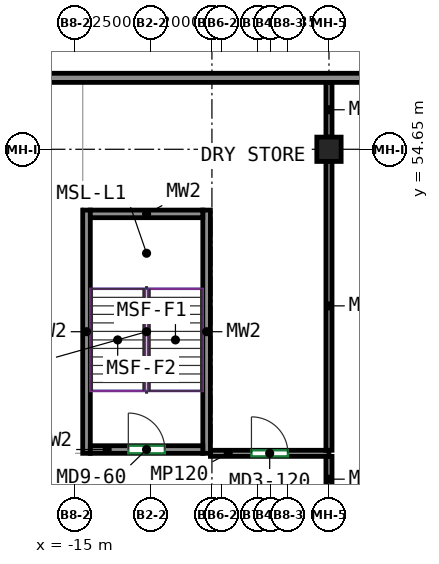
"""IFC4 building model, lengths in metres.
Left out: names, types, materials, properties, quantities, classifications, styles, units other than length and angle.
Written with IfcOpenShell. Run it as: python <this file> out.ifc"""

import sys

from ifc_helpers import new_model, si_unit, direction, frame, frame_2d, origin, origin_2d, place, context, subcontext, project, spatial, rectangle, extrude, source, transform, mapped, element, fill, save


model = new_model("IFC4")
c1 = context("Model", 3, precision=1e-05, world=origin(), true_north=direction((0.0, 1.0)))
c2 = subcontext(c1, "Body", "Model", "MODEL_VIEW")
j1 = project(units=[si_unit("LENGTHUNIT", "METRE"), si_unit("PLANEANGLEUNIT", "RADIAN")], contexts=[c1])
p1 = place(None, origin())
s1 = spatial("IfcSite", under=j1, at=p1, CompositionType="ELEMENT")
p2 = place(p1, origin())
s2 = spatial("IfcBuilding", under=s1, at=p2, CompositionType="ELEMENT")
p3 = place(p2, frame((0.0, 0.0, 9.0)))
s3 = spatial("IfcBuildingStorey", under=s2, at=p3, CompositionType="ELEMENT", Elevation=9.0)
m1 = source(origin(), c2, "Body", "SweptSolid", [
    extrude(rectangle(XDim=0.8, YDim=0.8, at=origin_2d()), origin(), (0.0, 0.0, 1.0), 4.1),
])
p4 = place(p3, frame((-6.65, 54.65, 0.0), z_axis=(0.0, 0.0, 1.0), x_axis=(1.0, 0.0, 0.0)))
e1 = element("IfcColumn", 1, at=p4, inside=s3, PredefinedType="COLUMN", context=c2, shape_type="MappedRepresentation", body=[
    mapped(m1, transform((0.0, 0.0, 0.0))),
])
m2 = source(origin(), c2, "Body", "SweptSolid", [
    extrude(rectangle(XDim=8.0, YDim=0.25, at=frame_2d((4.0, 0.0))), origin(), (0.0, 0.0, 1.0), 4.1),
])
for number, where, z_axis, x_axis in (
    (2, (-14.625, 44.65, 0.0), (0.0, 0.0, 1.0), (0.0, 1.0, 0.0)),
    (3, (-10.675, 44.65, 0.0), (0.0, 0.0, 1.0), (0.0, 1.0, 0.0)),
):
    element("IfcWall", number, at=place(p3, frame(where, z_axis=z_axis, x_axis=x_axis)), inside=s3, PredefinedType="SHEAR", context=c2, shape_type="MappedRepresentation", body=[
        mapped(m2, transform((0.0, 0.0, 0.0))),
    ])
m3 = source(origin(), c2, "Body", "SweptSolid", [
    extrude(rectangle(XDim=3.7, YDim=0.25, at=frame_2d((1.85, 0.0))), origin(), (0.0, 0.0, 1.0), 4.1),
])
p5 = place(p3, frame((-14.5, 44.775, 0.0), z_axis=(0.0, 0.0, 1.0), x_axis=(1.0, 0.0, 0.0)))
e4 = element("IfcWall", 4, at=p5, inside=s3, PredefinedType="SHEAR", context=c2, shape_type="MappedRepresentation", body=[
    mapped(m3, transform((0.0, 0.0, 0.0))),
])
p6 = place(p5, frame((1.25, 0.0, 0.0)))
e5 = element("IfcOpeningElement", 5, at=p6, cuts=e4, PredefinedType="OPENING", context=c2, shape_type="SweptSolid", body=[
    extrude(rectangle(XDim=1.2, YDim=2.1, at=frame_2d((0.6, 1.05))), frame((0.0, 0.135, 0.0), z_axis=(0.0, -1.0, 0.0), x_axis=(1.0, 0.0, 0.0)), (0.0, 0.0, 1.0), 0.27),
])
p7 = place(p3, frame((-14.5, 52.525, 0.0), z_axis=(0.0, 0.0, 1.0), x_axis=(1.0, 0.0, 0.0)))
e6 = element("IfcWall", 6, at=p7, inside=s3, PredefinedType="SHEAR", context=c2, shape_type="MappedRepresentation", body=[
    mapped(m3, transform((0.0, 0.0, 0.0))),
])
m4 = source(origin(), c2, "Body", "SweptSolid", [
    extrude(rectangle(XDim=112.7, YDim=0.3, at=frame_2d((56.35, 0.0))), origin(), (0.0, 0.0, 1.0), 4.1),
])
p8 = place(p3, frame((-56.85, 57.0, 0.0), z_axis=(0.0, 0.0, 1.0), x_axis=(1.0, 0.0, 0.0)))
e7 = element("IfcWall", 7, at=p8, inside=s3, PredefinedType="SOLIDWALL", context=c2, shape_type="MappedRepresentation", body=[
    mapped(m4, transform((0.0, 0.0, 0.0))),
])
p9 = place(p8, frame((3.15, 0.0, 0.9)))
e8 = element("IfcOpeningElement", 8, at=p9, cuts=e7, PredefinedType="OPENING", context=c2, shape_type="SweptSolid", body=[
    extrude(rectangle(XDim=2.4, YDim=1.8, at=frame_2d((1.2, 0.9))), frame((0.0, 0.16, 0.0), z_axis=(0.0, -1.0, 0.0), x_axis=(1.0, 0.0, 0.0)), (0.0, 0.0, 1.0), 0.32),
])
p10 = place(p8, frame((7.15, 0.0, 0.9)))
e9 = element("IfcOpeningElement", 9, at=p10, cuts=e7, PredefinedType="OPENING", context=c2, shape_type="SweptSolid", body=[
    extrude(rectangle(XDim=2.4, YDim=1.8, at=frame_2d((1.2, 0.9))), frame((0.0, 0.16, 0.0), z_axis=(0.0, -1.0, 0.0), x_axis=(1.0, 0.0, 0.0)), (0.0, 0.0, 1.0), 0.32),
])
p11 = place(p8, frame((11.15, 0.0, 0.9)))
e10 = element("IfcOpeningElement", 10, at=p11, cuts=e7, PredefinedType="OPENING", context=c2, shape_type="SweptSolid", body=[
    extrude(rectangle(XDim=2.4, YDim=1.8, at=frame_2d((1.2, 0.9))), frame((0.0, 0.16, 0.0), z_axis=(0.0, -1.0, 0.0), x_axis=(1.0, 0.0, 0.0)), (0.0, 0.0, 1.0), 0.32),
])
p12 = place(p8, frame((15.15, 0.0, 0.9)))
e11 = element("IfcOpeningElement", 11, at=p12, cuts=e7, PredefinedType="OPENING", context=c2, shape_type="SweptSolid", body=[
    extrude(rectangle(XDim=2.4, YDim=1.8, at=frame_2d((1.2, 0.9))), frame((0.0, 0.16, 0.0), z_axis=(0.0, -1.0, 0.0), x_axis=(1.0, 0.0, 0.0)), (0.0, 0.0, 1.0), 0.32),
])
p13 = place(p8, frame((19.15, 0.0, 0.9)))
e12 = element("IfcOpeningElement", 12, at=p13, cuts=e7, PredefinedType="OPENING", context=c2, shape_type="SweptSolid", body=[
    extrude(rectangle(XDim=2.4, YDim=1.8, at=frame_2d((1.2, 0.9))), frame((0.0, 0.16, 0.0), z_axis=(0.0, -1.0, 0.0), x_axis=(1.0, 0.0, 0.0)), (0.0, 0.0, 1.0), 0.32),
])
p14 = place(p8, frame((23.15, 0.0, 0.9)))
e13 = element("IfcOpeningElement", 13, at=p14, cuts=e7, PredefinedType="OPENING", context=c2, shape_type="SweptSolid", body=[
    extrude(rectangle(XDim=2.4, YDim=1.8, at=frame_2d((1.2, 0.9))), frame((0.0, 0.16, 0.0), z_axis=(0.0, -1.0, 0.0), x_axis=(1.0, 0.0, 0.0)), (0.0, 0.0, 1.0), 0.32),
])
p15 = place(p8, frame((27.15, 0.0, 0.9)))
e14 = element("IfcOpeningElement", 14, at=p15, cuts=e7, PredefinedType="OPENING", context=c2, shape_type="SweptSolid", body=[
    extrude(rectangle(XDim=2.4, YDim=1.8, at=frame_2d((1.2, 0.9))), frame((0.0, 0.16, 0.0), z_axis=(0.0, -1.0, 0.0), x_axis=(1.0, 0.0, 0.0)), (0.0, 0.0, 1.0), 0.32),
])
p16 = place(p8, frame((31.15, 0.0, 0.9)))
e15 = element("IfcOpeningElement", 15, at=p16, cuts=e7, PredefinedType="OPENING", context=c2, shape_type="SweptSolid", body=[
    extrude(rectangle(XDim=2.4, YDim=1.8, at=frame_2d((1.2, 0.9))), frame((0.0, 0.16, 0.0), z_axis=(0.0, -1.0, 0.0), x_axis=(1.0, 0.0, 0.0)), (0.0, 0.0, 1.0), 0.32),
])
p17 = place(p8, frame((35.15, 0.0, 0.9)))
e16 = element("IfcOpeningElement", 16, at=p17, cuts=e7, PredefinedType="OPENING", context=c2, shape_type="SweptSolid", body=[
    extrude(rectangle(XDim=2.4, YDim=1.8, at=frame_2d((1.2, 0.9))), frame((0.0, 0.16, 0.0), z_axis=(0.0, -1.0, 0.0), x_axis=(1.0, 0.0, 0.0)), (0.0, 0.0, 1.0), 0.32),
])
p18 = place(p8, frame((43.15, 0.0, 0.9)))
e17 = element("IfcOpeningElement", 17, at=p18, cuts=e7, PredefinedType="OPENING", context=c2, shape_type="SweptSolid", body=[
    extrude(rectangle(XDim=2.4, YDim=1.8, at=frame_2d((1.2, 0.9))), frame((0.0, 0.16, 0.0), z_axis=(0.0, -1.0, 0.0), x_axis=(1.0, 0.0, 0.0)), (0.0, 0.0, 1.0), 0.32),
])
p19 = place(p8, frame((47.15, 0.0, 0.9)))
e18 = element("IfcOpeningElement", 18, at=p19, cuts=e7, PredefinedType="OPENING", context=c2, shape_type="SweptSolid", body=[
    extrude(rectangle(XDim=2.4, YDim=1.8, at=frame_2d((1.2, 0.9))), frame((0.0, 0.16, 0.0), z_axis=(0.0, -1.0, 0.0), x_axis=(1.0, 0.0, 0.0)), (0.0, 0.0, 1.0), 0.32),
])
p20 = place(p8, frame((51.15, 0.0, 0.9)))
e19 = element("IfcOpeningElement", 19, at=p20, cuts=e7, PredefinedType="OPENING", context=c2, shape_type="SweptSolid", body=[
    extrude(rectangle(XDim=2.4, YDim=1.8, at=frame_2d((1.2, 0.9))), frame((0.0, 0.16, 0.0), z_axis=(0.0, -1.0, 0.0), x_axis=(1.0, 0.0, 0.0)), (0.0, 0.0, 1.0), 0.32),
])
p21 = place(p8, frame((55.15, 0.0, 0.9)))
e20 = element("IfcOpeningElement", 20, at=p21, cuts=e7, PredefinedType="OPENING", context=c2, shape_type="SweptSolid", body=[
    extrude(rectangle(XDim=2.4, YDim=1.8, at=frame_2d((1.2, 0.9))), frame((0.0, 0.16, 0.0), z_axis=(0.0, -1.0, 0.0), x_axis=(1.0, 0.0, 0.0)), (0.0, 0.0, 1.0), 0.32),
])
p22 = place(p8, frame((59.15, 0.0, 0.9)))
e21 = element("IfcOpeningElement", 21, at=p22, cuts=e7, PredefinedType="OPENING", context=c2, shape_type="SweptSolid", body=[
    extrude(rectangle(XDim=2.4, YDim=1.8, at=frame_2d((1.2, 0.9))), frame((0.0, 0.16, 0.0), z_axis=(0.0, -1.0, 0.0), x_axis=(1.0, 0.0, 0.0)), (0.0, 0.0, 1.0), 0.32),
])
p23 = place(p8, frame((63.15, 0.0, 0.9)))
e22 = element("IfcOpeningElement", 22, at=p23, cuts=e7, PredefinedType="OPENING", context=c2, shape_type="SweptSolid", body=[
    extrude(rectangle(XDim=2.4, YDim=1.8, at=frame_2d((1.2, 0.9))), frame((0.0, 0.16, 0.0), z_axis=(0.0, -1.0, 0.0), x_axis=(1.0, 0.0, 0.0)), (0.0, 0.0, 1.0), 0.32),
])
p24 = place(p8, frame((67.15, 0.0, 0.9)))
e23 = element("IfcOpeningElement", 23, at=p24, cuts=e7, PredefinedType="OPENING", context=c2, shape_type="SweptSolid", body=[
    extrude(rectangle(XDim=2.4, YDim=1.8, at=frame_2d((1.2, 0.9))), frame((0.0, 0.16, 0.0), z_axis=(0.0, -1.0, 0.0), x_axis=(1.0, 0.0, 0.0)), (0.0, 0.0, 1.0), 0.32),
])
p25 = place(p8, frame((71.15, 0.0, 0.9)))
e24 = element("IfcOpeningElement", 24, at=p25, cuts=e7, PredefinedType="OPENING", context=c2, shape_type="SweptSolid", body=[
    extrude(rectangle(XDim=2.4, YDim=1.8, at=frame_2d((1.2, 0.9))), frame((0.0, 0.16, 0.0), z_axis=(0.0, -1.0, 0.0), x_axis=(1.0, 0.0, 0.0)), (0.0, 0.0, 1.0), 0.32),
])
p26 = place(p8, frame((75.15, 0.0, 0.9)))
e25 = element("IfcOpeningElement", 25, at=p26, cuts=e7, PredefinedType="OPENING", context=c2, shape_type="SweptSolid", body=[
    extrude(rectangle(XDim=2.4, YDim=1.8, at=frame_2d((1.2, 0.9))), frame((0.0, 0.16, 0.0), z_axis=(0.0, -1.0, 0.0), x_axis=(1.0, 0.0, 0.0)), (0.0, 0.0, 1.0), 0.32),
])
p27 = place(p8, frame((79.15, 0.0, 0.9)))
e26 = element("IfcOpeningElement", 26, at=p27, cuts=e7, PredefinedType="OPENING", context=c2, shape_type="SweptSolid", body=[
    extrude(rectangle(XDim=2.4, YDim=1.8, at=frame_2d((1.2, 0.9))), frame((0.0, 0.16, 0.0), z_axis=(0.0, -1.0, 0.0), x_axis=(1.0, 0.0, 0.0)), (0.0, 0.0, 1.0), 0.32),
])
p28 = place(p8, frame((83.15, 0.0, 0.9)))
e27 = element("IfcOpeningElement", 27, at=p28, cuts=e7, PredefinedType="OPENING", context=c2, shape_type="SweptSolid", body=[
    extrude(rectangle(XDim=2.4, YDim=1.8, at=frame_2d((1.2, 0.9))), frame((0.0, 0.16, 0.0), z_axis=(0.0, -1.0, 0.0), x_axis=(1.0, 0.0, 0.0)), (0.0, 0.0, 1.0), 0.32),
])
p29 = place(p8, frame((87.15, 0.0, 0.9)))
e28 = element("IfcOpeningElement", 28, at=p29, cuts=e7, PredefinedType="OPENING", context=c2, shape_type="SweptSolid", body=[
    extrude(rectangle(XDim=2.4, YDim=1.8, at=frame_2d((1.2, 0.9))), frame((0.0, 0.16, 0.0), z_axis=(0.0, -1.0, 0.0), x_axis=(1.0, 0.0, 0.0)), (0.0, 0.0, 1.0), 0.32),
])
p30 = place(p8, frame((91.15, 0.0, 0.9)))
e29 = element("IfcOpeningElement", 29, at=p30, cuts=e7, PredefinedType="OPENING", context=c2, shape_type="SweptSolid", body=[
    extrude(rectangle(XDim=2.4, YDim=1.8, at=frame_2d((1.2, 0.9))), frame((0.0, 0.16, 0.0), z_axis=(0.0, -1.0, 0.0), x_axis=(1.0, 0.0, 0.0)), (0.0, 0.0, 1.0), 0.32),
])
p31 = place(p8, frame((95.15, 0.0, 0.9)))
e30 = element("IfcOpeningElement", 30, at=p31, cuts=e7, PredefinedType="OPENING", context=c2, shape_type="SweptSolid", body=[
    extrude(rectangle(XDim=2.4, YDim=1.8, at=frame_2d((1.2, 0.9))), frame((0.0, 0.16, 0.0), z_axis=(0.0, -1.0, 0.0), x_axis=(1.0, 0.0, 0.0)), (0.0, 0.0, 1.0), 0.32),
])
p32 = place(p8, frame((103.15, 0.0, 0.9)))
e31 = element("IfcOpeningElement", 31, at=p32, cuts=e7, PredefinedType="OPENING", context=c2, shape_type="SweptSolid", body=[
    extrude(rectangle(XDim=2.4, YDim=1.8, at=frame_2d((1.2, 0.9))), frame((0.0, 0.16, 0.0), z_axis=(0.0, -1.0, 0.0), x_axis=(1.0, 0.0, 0.0)), (0.0, 0.0, 1.0), 0.32),
])
p33 = place(p8, frame((107.15, 0.0, 0.9)))
e32 = element("IfcOpeningElement", 32, at=p33, cuts=e7, PredefinedType="OPENING", context=c2, shape_type="SweptSolid", body=[
    extrude(rectangle(XDim=2.4, YDim=1.8, at=frame_2d((1.2, 0.9))), frame((0.0, 0.16, 0.0), z_axis=(0.0, -1.0, 0.0), x_axis=(1.0, 0.0, 0.0)), (0.0, 0.0, 1.0), 0.32),
])
m5 = source(origin(), c2, "Body", "SweptSolid", [
    extrude(rectangle(XDim=3.9, YDim=0.2, at=frame_2d((1.95, 0.0))), origin(), (0.0, 0.0, 1.0), 3.2),
])
p34 = place(p3, frame((-10.55, 44.65, 0.0), z_axis=(0.0, 0.0, 1.0), x_axis=(1.0, 0.0, 0.0)))
e33 = element("IfcWall", 33, at=p34, inside=s3, PredefinedType="PARTITIONING", context=c2, shape_type="MappedRepresentation", body=[
    mapped(m5, transform((0.0, 0.0, 0.0))),
])
p35 = place(p34, frame((1.35, 0.0, 0.0)))
e34 = element("IfcOpeningElement", 34, at=p35, cuts=e33, PredefinedType="OPENING", context=c2, shape_type="SweptSolid", body=[
    extrude(rectangle(XDim=1.2, YDim=2.1, at=frame_2d((0.6, 1.05))), frame((0.0, 0.11, 0.0), z_axis=(0.0, -1.0, 0.0), x_axis=(1.0, 0.0, 0.0)), (0.0, 0.0, 1.0), 0.22),
])
m6 = source(origin(), c2, "Body", "SweptSolid", [
    extrude(rectangle(XDim=1.5, YDim=0.2, at=frame_2d((0.75, 0.0))), origin(), (0.0, 0.0, 1.0), 3.2),
])
p36 = place(p3, frame((-6.65, 44.55, 0.0), z_axis=(0.0, 0.0, 1.0), x_axis=(0.0, -1.0, 0.0)))
e35 = element("IfcWall", 35, at=p36, inside=s3, PredefinedType="PARTITIONING", context=c2, shape_type="MappedRepresentation", body=[
    mapped(m6, transform((0.0, 0.0, 0.0))),
])
m7 = source(origin(), c2, "Body", "SweptSolid", [
    extrude(rectangle(XDim=9.5, YDim=0.2, at=frame_2d((4.75, 0.0))), origin(), (0.0, 0.0, 1.0), 3.2),
])
p37 = place(p3, frame((-6.65, 54.25, 0.0), z_axis=(0.0, 0.0, 1.0), x_axis=(0.0, -1.0, 0.0)))
e36 = element("IfcWall", 36, at=p37, inside=s3, PredefinedType="PARTITIONING", context=c2, shape_type="MappedRepresentation", body=[
    mapped(m7, transform((0.0, 0.0, 0.0))),
])
m8 = source(origin(), c2, "Body", "SweptSolid", [
    extrude(rectangle(XDim=1.8, YDim=0.2, at=frame_2d((0.9, 0.0))), origin(), (0.0, 0.0, 1.0), 4.1),
])
p38 = place(p3, frame((-6.65, 56.85, 0.0), z_axis=(0.0, 0.0, 1.0), x_axis=(0.0, -1.0, 0.0)))
e37 = element("IfcWall", 37, at=p38, inside=s3, PredefinedType="PARTITIONING", context=c2, shape_type="MappedRepresentation", body=[
    mapped(m8, transform((0.0, 0.0, 0.0))),
])
p39 = place(p18, origin())
e38 = element("IfcWindow", 38, at=p39, inside=s3, PartitioningType="SINGLE_PANEL", PredefinedType="WINDOW", context=c2, shape_type="SweptSolid", body=[
    extrude(rectangle(XDim=2.4, YDim=1.8, at=frame_2d((1.2, 0.9))), frame((0.0, 0.03, 0.0), z_axis=(0.0, -1.0, 0.0), x_axis=(1.0, 0.0, 0.0)), (0.0, 0.0, 1.0), 0.06),
])
fill(e17, e38)
p40 = place(p19, origin())
e39 = element("IfcWindow", 39, at=p40, inside=s3, PartitioningType="SINGLE_PANEL", PredefinedType="WINDOW", context=c2, shape_type="SweptSolid", body=[
    extrude(rectangle(XDim=2.4, YDim=1.8, at=frame_2d((1.2, 0.9))), frame((0.0, 0.03, 0.0), z_axis=(0.0, -1.0, 0.0), x_axis=(1.0, 0.0, 0.0)), (0.0, 0.0, 1.0), 0.06),
])
fill(e18, e39)
p41 = place(p20, origin())
e40 = element("IfcWindow", 40, at=p41, inside=s3, PartitioningType="SINGLE_PANEL", PredefinedType="WINDOW", context=c2, shape_type="SweptSolid", body=[
    extrude(rectangle(XDim=2.4, YDim=1.8, at=frame_2d((1.2, 0.9))), frame((0.0, 0.03, 0.0), z_axis=(0.0, -1.0, 0.0), x_axis=(1.0, 0.0, 0.0)), (0.0, 0.0, 1.0), 0.06),
])
fill(e19, e40)
p42 = place(p6, origin())
e41 = element("IfcDoor", 41, at=p42, inside=s3, OperationType="DOUBLE_DOOR_SINGLE_SWING", PredefinedType="DOOR", context=c2, shape_type="SweptSolid", body=[
    extrude(rectangle(XDim=1.2, YDim=2.1, at=frame_2d((0.6, 1.05))), frame((0.0, 0.025, 0.0), z_axis=(0.0, -1.0, 0.0), x_axis=(1.0, 0.0, 0.0)), (0.0, 0.0, 1.0), 0.05),
])
fill(e5, e41)
p43 = place(p35, origin())
e42 = element("IfcDoor", 42, at=p43, inside=s3, OperationType="SINGLE_SWING_LEFT", PredefinedType="DOOR", context=c2, shape_type="SweptSolid", body=[
    extrude(rectangle(XDim=1.2, YDim=2.1, at=frame_2d((0.6, 1.05))), frame((0.0, 0.025, 0.0), z_axis=(0.0, -1.0, 0.0), x_axis=(1.0, 0.0, 0.0)), (0.0, 0.0, 1.0), 0.05),
])
fill(e34, e42)
save(model, sys.argv[1])
